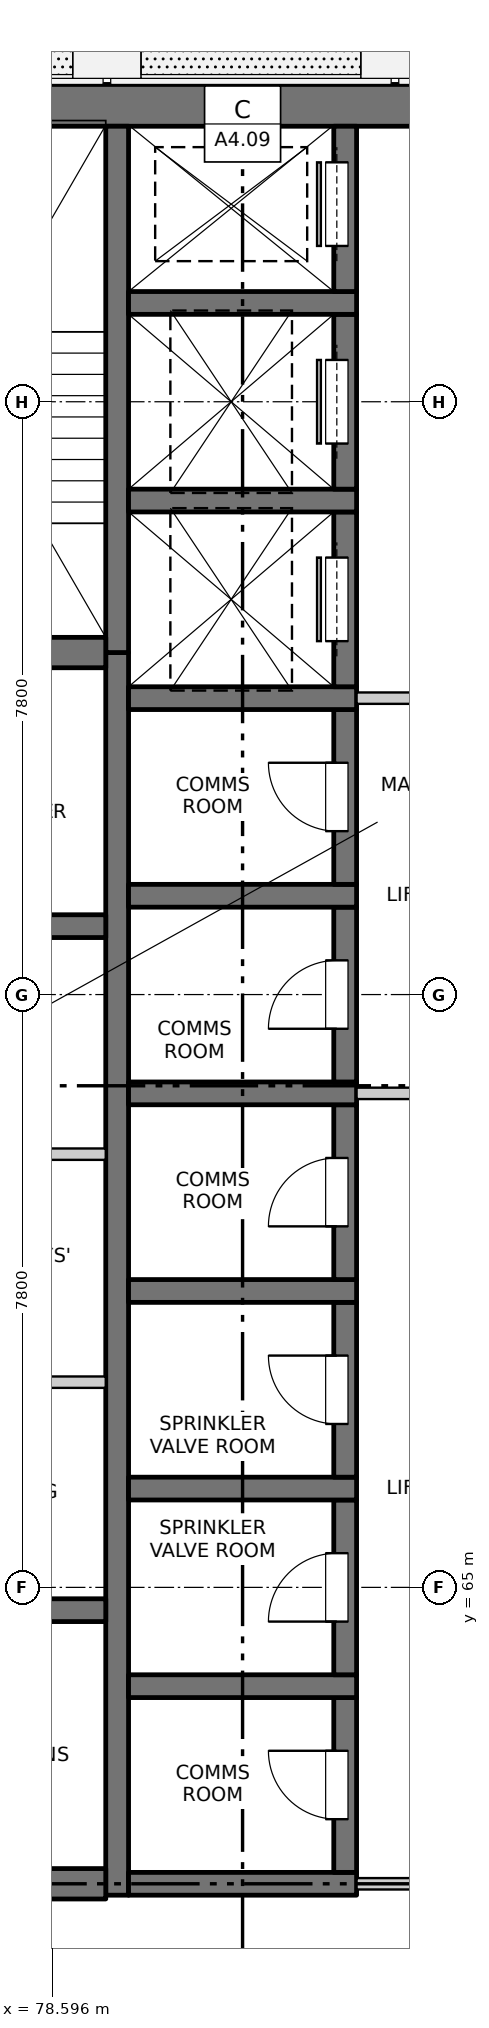
"""IFC4 building model, lengths in metres.
Left out: names, types, materials, properties, quantities, classifications, styles, units other than length and angle.
Written with IfcOpenShell. Run it as: python <this file> out.ifc"""

import sys

from ifc_helpers import new_model, si_unit, direction, frame, frame_2d, origin, place, context, subcontext, project, spatial, rectangle, extrude, element, fill, save


model = new_model("IFC4")
c1 = context("Model", 3, precision=1e-05, world=origin(), true_north=direction((0.0, 1.0)))
c2 = subcontext(c1, "Body", "Model", "MODEL_VIEW")
j1 = project(units=[si_unit("LENGTHUNIT", "METRE"), si_unit("PLANEANGLEUNIT", "RADIAN")], contexts=[c1])
p1 = place(None, origin())
s1 = spatial("IfcSite", under=j1, at=p1, CompositionType="ELEMENT")
p2 = place(p1, origin())
s2 = spatial("IfcBuilding", under=s1, at=p2, CompositionType="ELEMENT")
p3 = place(p2, frame((0.0, 0.0, 169.0)))
s3 = spatial("IfcBuildingStorey", under=s2, at=p3, CompositionType="ELEMENT", Elevation=169.0)
p4 = place(p3, frame((75.525, 84.5, -0.25), z_axis=(0.0, 0.0, 1.0), x_axis=(1.0, 0.0, 0.0)))
e1 = element("IfcWall", 1, at=p4, inside=s3, PredefinedType="SOLIDWALL", context=c2, shape_type="SweptSolid", body=[
    extrude(rectangle(XDim=18.95, YDim=0.55, at=frame_2d((9.475, 0.0))), origin(), (0.0, 0.0, 1.0), 3.35),
])
p5 = place(p3, frame((79.45, 60.95, -0.25), z_axis=(0.0, 0.0, 1.0), x_axis=(0.0, 1.0, 0.0)))
e2 = element("IfcWall", 2, at=p5, inside=s3, PredefinedType="SOLIDWALL", context=c2, shape_type="SweptSolid", body=[
    extrude(rectangle(XDim=16.35, YDim=0.3, at=frame_2d((8.175, 0.0))), origin(), (0.0, 0.0, 1.0), 3.35),
])
p6 = place(p3, frame((79.45, 77.3, -0.25), z_axis=(0.0, 0.0, 1.0), x_axis=(0.0, 1.0, 0.0)))
e3 = element("IfcWall", 3, at=p6, inside=s3, PredefinedType="SOLIDWALL", context=c2, shape_type="SweptSolid", body=[
    extrude(rectangle(XDim=6.925, YDim=0.3, at=frame_2d((3.462, 0.0))), origin(), (0.0, 0.0, 1.0), 3.35),
])
p7 = place(p3, frame((79.6, 61.1, -0.25), z_axis=(0.0, 0.0, 1.0), x_axis=(1.0, 0.0, 0.0)))
e4 = element("IfcWall", 4, at=p7, inside=s3, PredefinedType="SOLIDWALL", context=c2, shape_type="SweptSolid", body=[
    extrude(rectangle(XDim=3.0, YDim=0.3, at=frame_2d((1.5, 0.0))), origin(), (0.0, 0.0, 1.0), 3.35),
])
p8 = place(p3, frame((82.45, 61.25, -0.25), z_axis=(0.0, 0.0, 1.0), x_axis=(0.0, 1.0, 0.0)))
e5 = element("IfcWall", 5, at=p8, inside=s3, PredefinedType="SOLIDWALL", context=c2, shape_type="SweptSolid", body=[
    extrude(rectangle(XDim=2.3, YDim=0.3, at=frame_2d((1.15, 0.0))), origin(), (0.0, 0.0, 1.0), 3.35),
])
p9 = place(p8, frame((0.7, 0.0, 0.25)))
e6 = element("IfcOpeningElement", 6, at=p9, cuts=e5, PredefinedType="OPENING", context=c2, shape_type="SweptSolid", body=[
    extrude(rectangle(XDim=0.9, YDim=2.1, at=frame_2d((0.45, 1.05))), frame((0.0, 0.16, 0.0), z_axis=(0.0, -1.0, 0.0), x_axis=(1.0, 0.0, 0.0)), (0.0, 0.0, 1.0), 0.32),
])
p10 = place(p3, frame((79.6, 63.7, -0.25), z_axis=(0.0, 0.0, 1.0), x_axis=(1.0, 0.0, 0.0)))
e7 = element("IfcWall", 7, at=p10, inside=s3, PredefinedType="SOLIDWALL", context=c2, shape_type="SweptSolid", body=[
    extrude(rectangle(XDim=3.0, YDim=0.3, at=frame_2d((1.5, 0.0))), origin(), (0.0, 0.0, 1.0), 3.35),
])
p11 = place(p3, frame((82.45, 63.85, -0.25), z_axis=(0.0, 0.0, 1.0), x_axis=(0.0, 1.0, 0.0)))
e8 = element("IfcWall", 8, at=p11, inside=s3, PredefinedType="SOLIDWALL", context=c2, shape_type="SweptSolid", body=[
    extrude(rectangle(XDim=2.3, YDim=0.3, at=frame_2d((1.15, 0.0))), origin(), (0.0, 0.0, 1.0), 3.35),
])
p12 = place(p11, frame((0.7, 0.0, 0.25)))
e9 = element("IfcOpeningElement", 9, at=p12, cuts=e8, PredefinedType="OPENING", context=c2, shape_type="SweptSolid", body=[
    extrude(rectangle(XDim=0.9, YDim=2.1, at=frame_2d((0.45, 1.05))), frame((0.0, 0.16, 0.0), z_axis=(0.0, -1.0, 0.0), x_axis=(1.0, 0.0, 0.0)), (0.0, 0.0, 1.0), 0.32),
])
p13 = place(p3, frame((79.6, 66.3, -0.25), z_axis=(0.0, 0.0, 1.0), x_axis=(1.0, 0.0, 0.0)))
e10 = element("IfcWall", 10, at=p13, inside=s3, PredefinedType="SOLIDWALL", context=c2, shape_type="SweptSolid", body=[
    extrude(rectangle(XDim=3.0, YDim=0.3, at=frame_2d((1.5, 0.0))), origin(), (0.0, 0.0, 1.0), 3.35),
])
p14 = place(p3, frame((82.45, 66.45, -0.25), z_axis=(0.0, 0.0, 1.0), x_axis=(0.0, 1.0, 0.0)))
e11 = element("IfcWall", 11, at=p14, inside=s3, PredefinedType="SOLIDWALL", context=c2, shape_type="SweptSolid", body=[
    extrude(rectangle(XDim=2.3, YDim=0.3, at=frame_2d((1.15, 0.0))), origin(), (0.0, 0.0, 1.0), 3.35),
])
p15 = place(p14, frame((0.7, 0.0, 0.25)))
e12 = element("IfcOpeningElement", 12, at=p15, cuts=e11, PredefinedType="OPENING", context=c2, shape_type="SweptSolid", body=[
    extrude(rectangle(XDim=0.9, YDim=2.1, at=frame_2d((0.45, 1.05))), frame((0.0, 0.16, 0.0), z_axis=(0.0, -1.0, 0.0), x_axis=(1.0, 0.0, 0.0)), (0.0, 0.0, 1.0), 0.32),
])
p16 = place(p3, frame((79.6, 68.9, -0.25), z_axis=(0.0, 0.0, 1.0), x_axis=(1.0, 0.0, 0.0)))
e13 = element("IfcWall", 13, at=p16, inside=s3, PredefinedType="SOLIDWALL", context=c2, shape_type="SweptSolid", body=[
    extrude(rectangle(XDim=3.0, YDim=0.3, at=frame_2d((1.5, 0.0))), origin(), (0.0, 0.0, 1.0), 3.35),
])
p17 = place(p3, frame((82.45, 69.05, -0.25), z_axis=(0.0, 0.0, 1.0), x_axis=(0.0, 1.0, 0.0)))
e14 = element("IfcWall", 14, at=p17, inside=s3, PredefinedType="SOLIDWALL", context=c2, shape_type="SweptSolid", body=[
    extrude(rectangle(XDim=2.3, YDim=0.3, at=frame_2d((1.15, 0.0))), origin(), (0.0, 0.0, 1.0), 3.35),
])
p18 = place(p17, frame((0.7, 0.0, 0.25)))
e15 = element("IfcOpeningElement", 15, at=p18, cuts=e14, PredefinedType="OPENING", context=c2, shape_type="SweptSolid", body=[
    extrude(rectangle(XDim=0.9, YDim=2.1, at=frame_2d((0.45, 1.05))), frame((0.0, 0.16, 0.0), z_axis=(0.0, -1.0, 0.0), x_axis=(1.0, 0.0, 0.0)), (0.0, 0.0, 1.0), 0.32),
])
p19 = place(p3, frame((79.6, 71.5, -0.25), z_axis=(0.0, 0.0, 1.0), x_axis=(1.0, 0.0, 0.0)))
e16 = element("IfcWall", 16, at=p19, inside=s3, PredefinedType="SOLIDWALL", context=c2, shape_type="SweptSolid", body=[
    extrude(rectangle(XDim=3.0, YDim=0.3, at=frame_2d((1.5, 0.0))), origin(), (0.0, 0.0, 1.0), 3.35),
])
p20 = place(p3, frame((82.45, 71.65, -0.25), z_axis=(0.0, 0.0, 1.0), x_axis=(0.0, 1.0, 0.0)))
e17 = element("IfcWall", 17, at=p20, inside=s3, PredefinedType="SOLIDWALL", context=c2, shape_type="SweptSolid", body=[
    extrude(rectangle(XDim=2.3, YDim=0.3, at=frame_2d((1.15, 0.0))), origin(), (0.0, 0.0, 1.0), 3.35),
])
p21 = place(p20, frame((0.7, 0.0, 0.25)))
e18 = element("IfcOpeningElement", 18, at=p21, cuts=e17, PredefinedType="OPENING", context=c2, shape_type="SweptSolid", body=[
    extrude(rectangle(XDim=0.9, YDim=2.1, at=frame_2d((0.45, 1.05))), frame((0.0, 0.16, 0.0), z_axis=(0.0, -1.0, 0.0), x_axis=(1.0, 0.0, 0.0)), (0.0, 0.0, 1.0), 0.32),
])
p22 = place(p3, frame((79.6, 74.1, -0.25), z_axis=(0.0, 0.0, 1.0), x_axis=(1.0, 0.0, 0.0)))
e19 = element("IfcWall", 19, at=p22, inside=s3, PredefinedType="SOLIDWALL", context=c2, shape_type="SweptSolid", body=[
    extrude(rectangle(XDim=3.0, YDim=0.3, at=frame_2d((1.5, 0.0))), origin(), (0.0, 0.0, 1.0), 3.35),
])
p23 = place(p3, frame((82.45, 74.25, -0.25), z_axis=(0.0, 0.0, 1.0), x_axis=(0.0, 1.0, 0.0)))
e20 = element("IfcWall", 20, at=p23, inside=s3, PredefinedType="SOLIDWALL", context=c2, shape_type="SweptSolid", body=[
    extrude(rectangle(XDim=2.3, YDim=0.3, at=frame_2d((1.15, 0.0))), origin(), (0.0, 0.0, 1.0), 3.35),
])
p24 = place(p23, frame((0.7, 0.0, 0.25)))
e21 = element("IfcOpeningElement", 21, at=p24, cuts=e20, PredefinedType="OPENING", context=c2, shape_type="SweptSolid", body=[
    extrude(rectangle(XDim=0.9, YDim=2.1, at=frame_2d((0.45, 1.05))), frame((0.0, 0.16, 0.0), z_axis=(0.0, -1.0, 0.0), x_axis=(1.0, 0.0, 0.0)), (0.0, 0.0, 1.0), 0.32),
])
p25 = place(p3, frame((79.6, 76.7, -0.25), z_axis=(0.0, 0.0, 1.0), x_axis=(1.0, 0.0, 0.0)))
e22 = element("IfcWall", 22, at=p25, inside=s3, PredefinedType="SOLIDWALL", context=c2, shape_type="SweptSolid", body=[
    extrude(rectangle(XDim=3.0, YDim=0.3, at=frame_2d((1.5, 0.0))), origin(), (0.0, 0.0, 1.0), 3.35),
])
p26 = place(p3, frame((82.45, 76.85, -0.25), z_axis=(0.0, 0.0, 1.0), x_axis=(0.0, 1.0, 0.0)))
e23 = element("IfcWall", 23, at=p26, inside=s3, PredefinedType="SOLIDWALL", context=c2, shape_type="SweptSolid", body=[
    extrude(rectangle(XDim=2.3, YDim=0.3, at=frame_2d((1.15, 0.0))), origin(), (0.0, 0.0, 1.0), 3.35),
])
p27 = place(p26, frame((0.6, 0.0, 0.25)))
e24 = element("IfcOpeningElement", 24, at=p27, cuts=e23, PredefinedType="OPENING", context=c2, shape_type="SweptSolid", body=[
    extrude(rectangle(XDim=1.1, YDim=2.1, at=frame_2d((0.55, 1.05))), frame((0.0, 0.16, 0.0), z_axis=(0.0, -1.0, 0.0), x_axis=(1.0, 0.0, 0.0)), (0.0, 0.0, 1.0), 0.32),
])
p28 = place(p3, frame((79.6, 79.3, -0.25), z_axis=(0.0, 0.0, 1.0), x_axis=(1.0, 0.0, 0.0)))
e25 = element("IfcWall", 25, at=p28, inside=s3, PredefinedType="SOLIDWALL", context=c2, shape_type="SweptSolid", body=[
    extrude(rectangle(XDim=3.0, YDim=0.3, at=frame_2d((1.5, 0.0))), origin(), (0.0, 0.0, 1.0), 3.35),
])
p29 = place(p3, frame((82.45, 79.45, -0.25), z_axis=(0.0, 0.0, 1.0), x_axis=(0.0, 1.0, 0.0)))
e26 = element("IfcWall", 26, at=p29, inside=s3, PredefinedType="SOLIDWALL", context=c2, shape_type="SweptSolid", body=[
    extrude(rectangle(XDim=2.3, YDim=0.3, at=frame_2d((1.15, 0.0))), origin(), (0.0, 0.0, 1.0), 3.35),
])
p30 = place(p29, frame((0.6, 0.0, 0.25)))
e27 = element("IfcOpeningElement", 27, at=p30, cuts=e26, PredefinedType="OPENING", context=c2, shape_type="SweptSolid", body=[
    extrude(rectangle(XDim=1.1, YDim=2.1, at=frame_2d((0.55, 1.05))), frame((0.0, 0.16, 0.0), z_axis=(0.0, -1.0, 0.0), x_axis=(1.0, 0.0, 0.0)), (0.0, 0.0, 1.0), 0.32),
])
p31 = place(p3, frame((79.6, 81.9, -0.25), z_axis=(0.0, 0.0, 1.0), x_axis=(1.0, 0.0, 0.0)))
e28 = element("IfcWall", 28, at=p31, inside=s3, PredefinedType="SOLIDWALL", context=c2, shape_type="SweptSolid", body=[
    extrude(rectangle(XDim=3.0, YDim=0.3, at=frame_2d((1.5, 0.0))), origin(), (0.0, 0.0, 1.0), 3.35),
])
p32 = place(p3, frame((82.45, 82.05, -0.25), z_axis=(0.0, 0.0, 1.0), x_axis=(0.0, 1.0, 0.0)))
e29 = element("IfcWall", 29, at=p32, inside=s3, PredefinedType="SOLIDWALL", context=c2, shape_type="SweptSolid", body=[
    extrude(rectangle(XDim=2.175, YDim=0.3, at=frame_2d((1.087, 0.0))), origin(), (0.0, 0.0, 1.0), 3.35),
])
p33 = place(p32, frame((0.6, 0.0, 0.25)))
e30 = element("IfcOpeningElement", 30, at=p33, cuts=e29, PredefinedType="OPENING", context=c2, shape_type="SweptSolid", body=[
    extrude(rectangle(XDim=1.1, YDim=2.1, at=frame_2d((0.55, 1.05))), frame((0.0, 0.16, 0.0), z_axis=(0.0, -1.0, 0.0), x_axis=(1.0, 0.0, 0.0)), (0.0, 0.0, 1.0), 0.32),
])
p34 = place(p3, frame((75.525, 61.1, -0.25), z_axis=(0.0, 0.0, 1.0), x_axis=(1.0, 0.0, 0.0)))
e31 = element("IfcWall", 31, at=p34, inside=s3, PredefinedType="SOLIDWALL", context=c2, shape_type="SweptSolid", body=[
    extrude(rectangle(XDim=3.775, YDim=0.4, at=frame_2d((1.888, 0.0))), origin(), (0.0, 0.0, 1.0), 3.35),
])
for number, where, z_axis, x_axis in (
    (32, (75.525, 64.7, -0.25), (0.0, 0.0, 1.0), (1.0, 0.0, 0.0)),
    (33, (75.525, 73.7, -0.25), (0.0, 0.0, 1.0), (1.0, 0.0, 0.0)),
):
    element("IfcWall", number, at=place(p3, frame(where, z_axis=z_axis, x_axis=x_axis)), inside=s3, PredefinedType="SOLIDWALL", context=c2, shape_type="SweptSolid", body=[
        extrude(rectangle(XDim=3.775, YDim=0.3, at=frame_2d((1.888, 0.0))), origin(), (0.0, 0.0, 1.0), 3.35),
    ])
p35 = place(p3, frame((75.525, 77.3, -0.25), z_axis=(0.0, 0.0, 1.0), x_axis=(1.0, 0.0, 0.0)))
e34 = element("IfcWall", 34, at=p35, inside=s3, PredefinedType="SOLIDWALL", context=c2, shape_type="SweptSolid", body=[
    extrude(rectangle(XDim=3.775, YDim=0.4, at=frame_2d((1.888, 0.0))), origin(), (0.0, 0.0, 1.0), 3.35),
])
p36 = place(p3, frame((82.6, 61.1, 0.0), z_axis=(0.0, 0.0, 1.0), x_axis=(1.0, 0.0, 0.0)))
e35 = element("IfcWall", 35, at=p36, inside=s3, PredefinedType="PARTITIONING", context=c2, shape_type="SweptSolid", body=[
    extrude(rectangle(XDim=4.8, YDim=0.15, at=frame_2d((2.4, 0.0))), origin(), (0.0, 0.0, 1.0), 3.1),
])
p37 = place(p36, frame((1.5, 0.0, 0.0)))
e36 = element("IfcOpeningElement", 36, at=p37, cuts=e35, PredefinedType="OPENING", context=c2, shape_type="SweptSolid", body=[
    extrude(rectangle(XDim=1.8, YDim=2.1, at=frame_2d((0.9, 1.05))), frame((0.0, 0.085, 0.0), z_axis=(0.0, -1.0, 0.0), x_axis=(1.0, 0.0, 0.0)), (0.0, 0.0, 1.0), 0.17),
])
for number, where, z_axis, x_axis in (
    (37, (75.525, 67.7, 0.0), (0.0, 0.0, 1.0), (1.0, 0.0, 0.0)),
    (38, (75.525, 70.7, 0.0), (0.0, 0.0, 1.0), (1.0, 0.0, 0.0)),
):
    element("IfcWall", number, at=place(p3, frame(where, z_axis=z_axis, x_axis=x_axis)), inside=s3, PredefinedType="PARTITIONING", context=c2, shape_type="SweptSolid", body=[
        extrude(rectangle(XDim=3.775, YDim=0.15, at=frame_2d((1.887, 0.0))), origin(), (0.0, 0.0, 1.0), 3.1),
    ])
p38 = place(p3, frame((82.6, 71.5, 0.0), z_axis=(0.0, 0.0, 1.0), x_axis=(1.0, 0.0, 0.0)))
e39 = element("IfcWall", 39, at=p38, inside=s3, PredefinedType="PARTITIONING", context=c2, shape_type="SweptSolid", body=[
    extrude(rectangle(XDim=4.8, YDim=0.15, at=frame_2d((2.4, 0.0))), origin(), (0.0, 0.0, 1.0), 3.1),
])
p39 = place(p38, frame((1.5, 0.0, 0.0)))
e40 = element("IfcOpeningElement", 40, at=p39, cuts=e39, PredefinedType="OPENING", context=c2, shape_type="SweptSolid", body=[
    extrude(rectangle(XDim=1.8, YDim=2.1, at=frame_2d((0.9, 1.05))), frame((0.0, 0.085, 0.0), z_axis=(0.0, -1.0, 0.0), x_axis=(1.0, 0.0, 0.0)), (0.0, 0.0, 1.0), 0.17),
])
p40 = place(p3, frame((82.6, 76.7, 0.0), z_axis=(0.0, 0.0, 1.0), x_axis=(1.0, 0.0, 0.0)))
e41 = element("IfcWall", 41, at=p40, inside=s3, PredefinedType="PARTITIONING", context=c2, shape_type="SweptSolid", body=[
    extrude(rectangle(XDim=4.8, YDim=0.15, at=frame_2d((2.4, 0.0))), origin(), (0.0, 0.0, 1.0), 3.1),
])
p41 = place(p40, frame((1.5, 0.0, 0.0)))
e42 = element("IfcOpeningElement", 42, at=p41, cuts=e41, PredefinedType="OPENING", context=c2, shape_type="SweptSolid", body=[
    extrude(rectangle(XDim=1.8, YDim=2.1, at=frame_2d((0.9, 1.05))), frame((0.0, 0.085, 0.0), z_axis=(0.0, -1.0, 0.0), x_axis=(1.0, 0.0, 0.0)), (0.0, 0.0, 1.0), 0.17),
])
p42 = place(p9, origin())
e43 = element("IfcDoor", 43, at=p42, inside=s3, OperationType="SINGLE_SWING_RIGHT", PredefinedType="DOOR", context=c2, shape_type="SweptSolid", body=[
    extrude(rectangle(XDim=0.9, YDim=2.1, at=frame_2d((0.45, 1.05))), frame((0.0, 0.135, 0.0), z_axis=(0.0, -1.0, 0.0), x_axis=(1.0, 0.0, 0.0)), (0.0, 0.0, 1.0), 0.05),
])
fill(e6, e43)
p43 = place(p12, origin())
e44 = element("IfcDoor", 44, at=p43, inside=s3, OperationType="SINGLE_SWING_LEFT", PredefinedType="DOOR", context=c2, shape_type="SweptSolid", body=[
    extrude(rectangle(XDim=0.9, YDim=2.1, at=frame_2d((0.45, 1.05))), frame((0.0, 0.135, 0.0), z_axis=(0.0, -1.0, 0.0), x_axis=(1.0, 0.0, 0.0)), (0.0, 0.0, 1.0), 0.05),
])
fill(e9, e44)
p44 = place(p15, origin())
e45 = element("IfcDoor", 45, at=p44, inside=s3, OperationType="SINGLE_SWING_RIGHT", PredefinedType="DOOR", context=c2, shape_type="SweptSolid", body=[
    extrude(rectangle(XDim=0.9, YDim=2.1, at=frame_2d((0.45, 1.05))), frame((0.0, 0.135, 0.0), z_axis=(0.0, -1.0, 0.0), x_axis=(1.0, 0.0, 0.0)), (0.0, 0.0, 1.0), 0.05),
])
fill(e12, e45)
p45 = place(p18, origin())
e46 = element("IfcDoor", 46, at=p45, inside=s3, OperationType="SINGLE_SWING_LEFT", PredefinedType="DOOR", context=c2, shape_type="SweptSolid", body=[
    extrude(rectangle(XDim=0.9, YDim=2.1, at=frame_2d((0.45, 1.05))), frame((0.0, 0.135, 0.0), z_axis=(0.0, -1.0, 0.0), x_axis=(1.0, 0.0, 0.0)), (0.0, 0.0, 1.0), 0.05),
])
fill(e15, e46)
p46 = place(p21, origin())
e47 = element("IfcDoor", 47, at=p46, inside=s3, OperationType="SINGLE_SWING_LEFT", PredefinedType="DOOR", context=c2, shape_type="SweptSolid", body=[
    extrude(rectangle(XDim=0.9, YDim=2.1, at=frame_2d((0.45, 1.05))), frame((0.0, 0.135, 0.0), z_axis=(0.0, -1.0, 0.0), x_axis=(1.0, 0.0, 0.0)), (0.0, 0.0, 1.0), 0.05),
])
fill(e18, e47)
p47 = place(p24, origin())
e48 = element("IfcDoor", 48, at=p47, inside=s3, OperationType="SINGLE_SWING_RIGHT", PredefinedType="DOOR", context=c2, shape_type="SweptSolid", body=[
    extrude(rectangle(XDim=0.9, YDim=2.1, at=frame_2d((0.45, 1.05))), frame((0.0, 0.135, 0.0), z_axis=(0.0, -1.0, 0.0), x_axis=(1.0, 0.0, 0.0)), (0.0, 0.0, 1.0), 0.05),
])
fill(e21, e48)
p48 = place(p27, origin())
e49 = element("IfcDoor", 49, at=p48, inside=s3, OperationType="SLIDING_TO_LEFT", PredefinedType="DOOR", context=c2, shape_type="SweptSolid", body=[
    extrude(rectangle(XDim=1.1, YDim=2.1, at=frame_2d((0.55, 1.05))), frame((0.0, 0.135, 0.0), z_axis=(0.0, -1.0, 0.0), x_axis=(1.0, 0.0, 0.0)), (0.0, 0.0, 1.0), 0.05),
])
fill(e24, e49)
p49 = place(p30, origin())
e50 = element("IfcDoor", 50, at=p49, inside=s3, OperationType="SLIDING_TO_LEFT", PredefinedType="DOOR", context=c2, shape_type="SweptSolid", body=[
    extrude(rectangle(XDim=1.1, YDim=2.1, at=frame_2d((0.55, 1.05))), frame((0.0, 0.135, 0.0), z_axis=(0.0, -1.0, 0.0), x_axis=(1.0, 0.0, 0.0)), (0.0, 0.0, 1.0), 0.05),
])
fill(e27, e50)
p50 = place(p33, origin())
e51 = element("IfcDoor", 51, at=p50, inside=s3, OperationType="SLIDING_TO_RIGHT", PredefinedType="DOOR", context=c2, shape_type="SweptSolid", body=[
    extrude(rectangle(XDim=1.1, YDim=2.1, at=frame_2d((0.55, 1.05))), frame((0.0, 0.135, 0.0), z_axis=(0.0, -1.0, 0.0), x_axis=(1.0, 0.0, 0.0)), (0.0, 0.0, 1.0), 0.05),
])
fill(e30, e51)
save(model, sys.argv[1])
